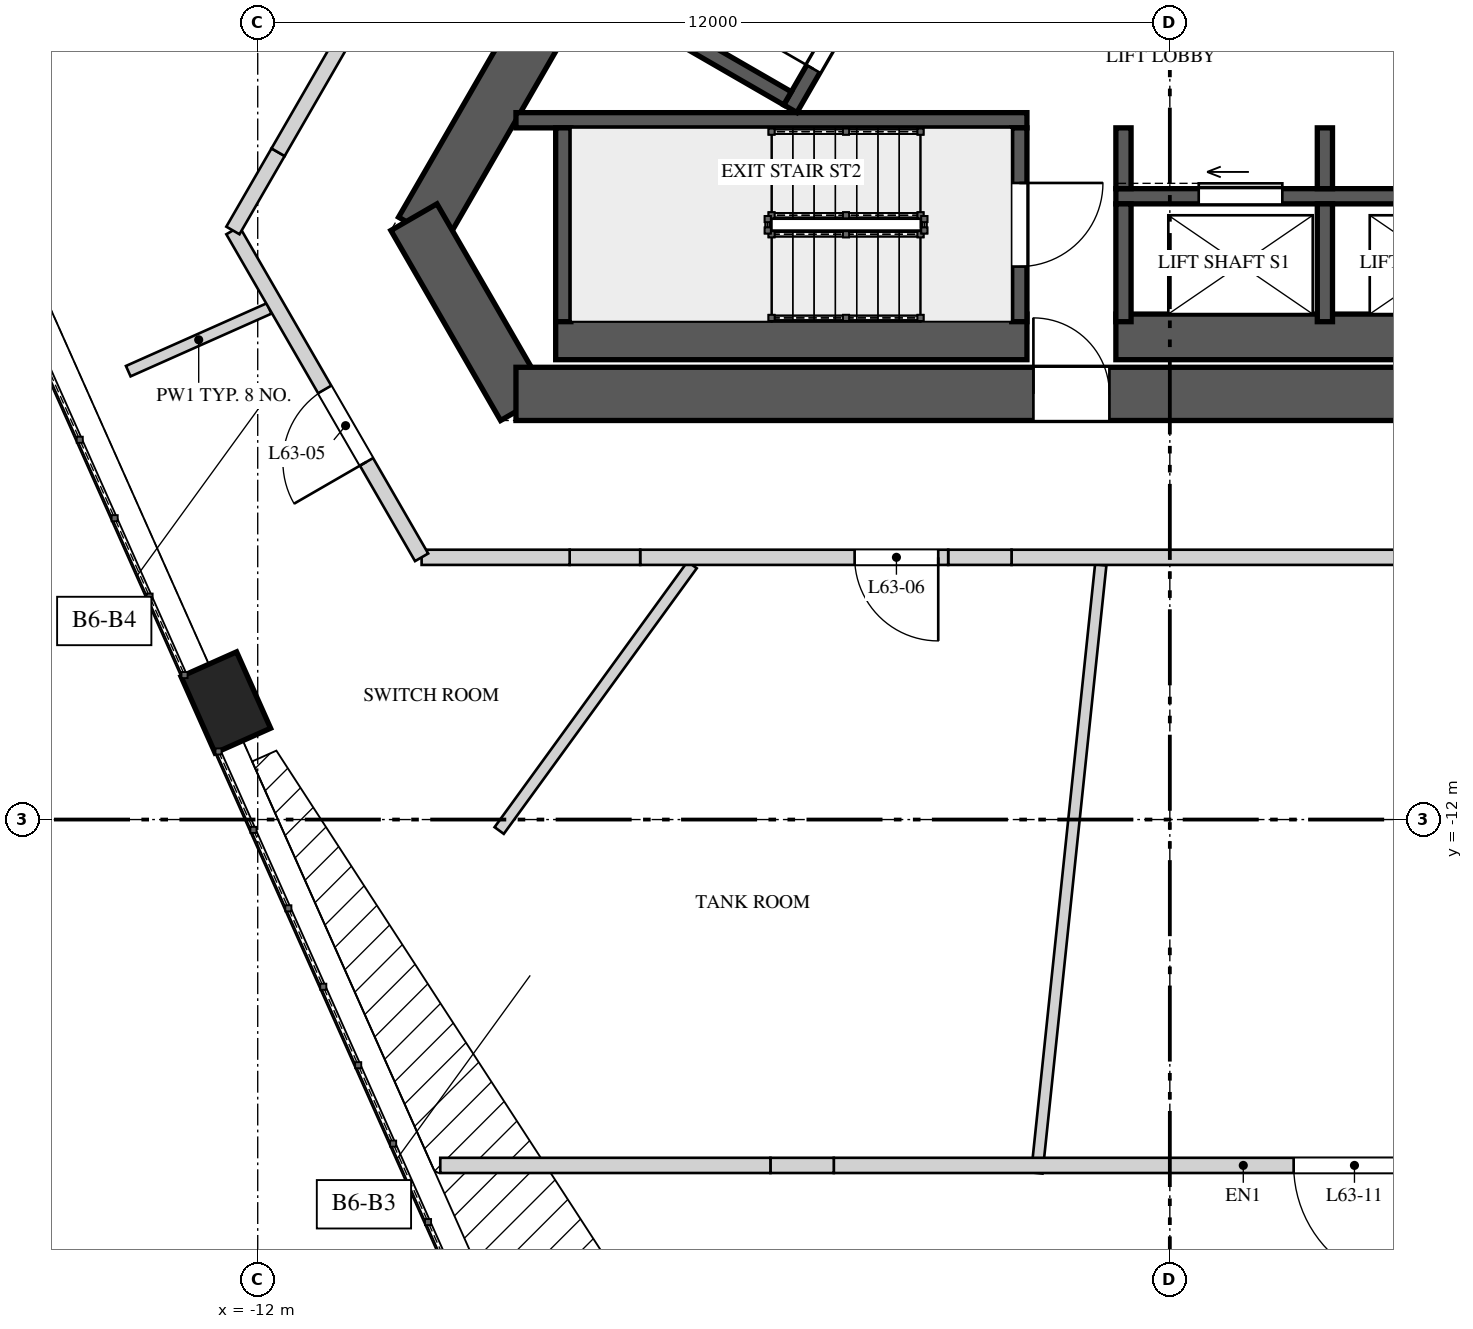
"""IFC4 building model, lengths in metres.
Left out: names, types, materials, properties, quantities, classifications, styles, units other than length and angle.
Written with IfcOpenShell. Run it as: python <this file> out.ifc"""

import sys

from ifc_helpers import new_model, si_unit, direction, frame, frame_2d, origin, origin_2d, place, context, subcontext, project, spatial, rectangle, extrude, element, fill, save


model = new_model("IFC4")
c1 = context("Model", 3, precision=1e-05, world=origin(), true_north=direction((0.0, 1.0)))
c2 = subcontext(c1, "Body", "Model", "MODEL_VIEW")
j1 = project(units=[si_unit("LENGTHUNIT", "METRE"), si_unit("PLANEANGLEUNIT", "RADIAN")], contexts=[c1])
p1 = place(None, origin())
s1 = spatial("IfcSite", under=j1, at=p1, CompositionType="ELEMENT")
p2 = place(p1, origin())
s2 = spatial("IfcBuilding", under=s1, at=p2, CompositionType="ELEMENT")
p3 = place(p2, frame((0.0, 0.0, 269.2)))
s3 = spatial("IfcBuildingStorey", under=s2, at=p3, CompositionType="ELEMENT", Elevation=269.2)
p4 = place(p3, frame((-1.241, 10.65, 0.0), z_axis=(0.0, 0.0, 1.0), x_axis=(-0.500003331888, -0.866023480109, 0.0)))
e1 = element("IfcWall", 1, at=p4, inside=s3, PredefinedType="SHEAR", context=c2, shape_type="SweptSolid", body=[
    extrude(rectangle(XDim=17.205, YDim=0.7, at=frame_2d((8.603, 0.0))), origin(), (0.0, 0.0, 1.0), 5.2),
])
p5 = place(p4, frame((6.808, 0.0, 0.0)))
e2 = element("IfcOpeningElement", 2, at=p5, cuts=e1, PredefinedType="OPENING", context=c2, shape_type="SweptSolid", body=[
    extrude(rectangle(XDim=1.0, YDim=2.4, at=frame_2d((0.5, 1.2))), frame((0.0, 0.36, 0.0), z_axis=(0.0, -1.0, 0.0), x_axis=(1.0, 0.0, 0.0)), (0.0, 0.0, 1.0), 0.72),
])
p6 = place(p3, frame((-9.945, -4.075, 0.0), z_axis=(0.0, 0.0, 1.0), x_axis=(0.499995765644, -0.866027848477, 0.0)))
e3 = element("IfcWall", 3, at=p6, inside=s3, PredefinedType="SHEAR", context=c2, shape_type="SweptSolid", body=[
    extrude(rectangle(XDim=2.887, YDim=0.7, at=frame_2d((1.443, 0.0))), origin(), (0.0, 0.0, 1.0), 5.2),
])
p7 = place(p3, frame((-8.603, -6.4, 0.0), z_axis=(0.0, 0.0, 1.0), x_axis=(1.0, 0.0, 0.0)))
e4 = element("IfcWall", 4, at=p7, inside=s3, PredefinedType="SHEAR", context=c2, shape_type="SweptSolid", body=[
    extrude(rectangle(XDim=17.205, YDim=0.7, at=frame_2d((8.603, 0.0))), origin(), (0.0, 0.0, 1.0), 5.2),
])
p8 = place(p7, frame((6.808, 0.0, 0.0)))
e5 = element("IfcOpeningElement", 5, at=p8, cuts=e4, PredefinedType="OPENING", context=c2, shape_type="SweptSolid", body=[
    extrude(rectangle(XDim=1.0, YDim=2.4, at=frame_2d((0.5, 1.2))), frame((0.0, 0.36, 0.0), z_axis=(0.0, -1.0, 0.0), x_axis=(1.0, 0.0, 0.0)), (0.0, 0.0, 1.0), 0.72),
])
p9 = place(p7, frame((14.922, 0.0, 0.0)))
e6 = element("IfcOpeningElement", 6, at=p9, cuts=e4, PredefinedType="OPENING", context=c2, shape_type="SweptSolid", body=[
    extrude(rectangle(XDim=0.8, YDim=2.1, at=frame_2d((0.4, 1.05))), frame((0.0, 0.36, 0.0), z_axis=(0.0, -1.0, 0.0), x_axis=(1.0, 0.0, 0.0)), (0.0, 0.0, 1.0), 0.72),
])
p10 = place(p3, frame((9.844, -4.25, 0.0), z_axis=(0.0, 0.0, 1.0), x_axis=(-0.500003331888, 0.866023480109, 0.0)))
e7 = element("IfcWall", 7, at=p10, inside=s3, PredefinedType="SHEAR", context=c2, shape_type="SweptSolid", body=[
    extrude(rectangle(XDim=17.205, YDim=0.7, at=frame_2d((8.603, 0.0))), origin(), (0.0, 0.0, 1.0), 5.2),
])
p11 = place(p10, frame((6.877, 0.0, 0.0)))
e8 = element("IfcOpeningElement", 8, at=p11, cuts=e7, PredefinedType="OPENING", context=c2, shape_type="SweptSolid", body=[
    extrude(rectangle(XDim=1.0, YDim=2.4, at=frame_2d((0.5, 1.2))), frame((0.0, 0.36, 0.0), z_axis=(0.0, -1.0, 0.0), x_axis=(1.0, 0.0, 0.0)), (0.0, 0.0, 1.0), 0.72),
])
p12 = place(p10, frame((14.445, 0.0, 0.0)))
e9 = element("IfcOpeningElement", 9, at=p12, cuts=e7, PredefinedType="OPENING", context=c2, shape_type="SweptSolid", body=[
    extrude(rectangle(XDim=0.8, YDim=2.1, at=frame_2d((0.4, 1.05))), frame((0.0, 0.36, 0.0), z_axis=(0.0, -1.0, 0.0), x_axis=(1.0, 0.0, 0.0)), (0.0, 0.0, 1.0), 0.72),
])
p13 = place(p3, frame((-12.42, -10.459, 0.0), z_axis=(0.0, 0.0, 1.0), x_axis=(0.406736643076, -0.913545457643, 0.0)))
e10 = element("IfcColumn", 10, at=p13, inside=s3, PredefinedType="COLUMN", context=c2, shape_type="SweptSolid", body=[
    extrude(rectangle(XDim=1.1, YDim=0.8, at=origin_2d()), origin(), (0.0, 0.0, 1.0), 2.787),
])
p14 = place(p3, frame((-8.08, -5.65, 0.0), z_axis=(0.0, 0.0, 1.0), x_axis=(1.0, 0.0, 0.0)))
e11 = element("IfcWall", 11, at=p14, inside=s3, PredefinedType="SOLIDWALL", context=c2, shape_type="SweptSolid", body=[
    extrude(rectangle(XDim=6.2, YDim=0.6, at=frame_2d((3.1, 0.0))), origin(), (0.0, 0.0, 1.0), 4.85),
])
p15 = place(p3, frame((-8.603, -2.8, 0.0), z_axis=(0.0, 0.0, 1.0), x_axis=(1.0, 0.0, 0.0)))
e12 = element("IfcWall", 12, at=p15, inside=s3, PredefinedType="SOLIDWALL", context=c2, shape_type="SweptSolid", body=[
    extrude(rectangle(XDim=6.723, YDim=0.2, at=frame_2d((3.361, 0.0))), origin(), (0.0, 0.0, 1.0), 4.85),
])
p16 = place(p3, frame((-7.98, -2.9, 0.0), z_axis=(0.0, 0.0, 1.0), x_axis=(0.0, -1.0, 0.0)))
e13 = element("IfcWall", 13, at=p16, inside=s3, PredefinedType="SOLIDWALL", context=c2, shape_type="SweptSolid", body=[
    extrude(rectangle(XDim=2.55, YDim=0.2, at=frame_2d((1.275, 0.0))), origin(), (0.0, 0.0, 1.0), 4.85),
])
p17 = place(p3, frame((-1.98, -2.9, 0.0), z_axis=(0.0, 0.0, 1.0), x_axis=(0.0, -1.0, 0.0)))
e14 = element("IfcWall", 14, at=p17, inside=s3, PredefinedType="SOLIDWALL", context=c2, shape_type="SweptSolid", body=[
    extrude(rectangle(XDim=2.55, YDim=0.2, at=frame_2d((1.275, 0.0))), origin(), (0.0, 0.0, 1.0), 4.85),
])
p18 = place(p17, frame((0.725, 0.0, 0.0)))
e15 = element("IfcOpeningElement", 15, at=p18, cuts=e14, PredefinedType="OPENING", context=c2, shape_type="SweptSolid", body=[
    extrude(rectangle(XDim=1.1, YDim=2.4, at=frame_2d((0.55, 1.2))), frame((0.0, 0.11, 0.0), z_axis=(0.0, -1.0, 0.0), x_axis=(1.0, 0.0, 0.0)), (0.0, 0.0, 1.0), 0.22),
])
p19 = place(p3, frame((-4.993, -2.648, 0.0), z_axis=(0.0, 0.0, 1.0), x_axis=(0.499996545922, 0.866027397988, 0.0)))
e16 = element("IfcWall", 16, at=p19, inside=s3, PredefinedType="SOLIDWALL", context=c2, shape_type="SweptSolid", body=[
    extrude(rectangle(XDim=5.5, YDim=0.2, at=frame_2d((2.75, 0.0))), origin(), (0.0, 0.0, 1.0), 4.85),
])
p20 = place(p19, frame((3.12, 0.0, 0.0)))
e17 = element("IfcOpeningElement", 17, at=p20, cuts=e16, PredefinedType="OPENING", context=c2, shape_type="SweptSolid", body=[
    extrude(rectangle(XDim=0.95, YDim=2.4, at=frame_2d((0.475, 1.2))), frame((0.0, 0.11, 0.0), z_axis=(0.0, -1.0, 0.0), x_axis=(1.0, 0.0, 0.0)), (0.0, 0.0, 1.0), 0.22),
])
p21 = place(p19, frame((0.605, 0.0, 0.0)))
e18 = element("IfcOpeningElement", 18, at=p21, cuts=e16, PredefinedType="OPENING", context=c2, shape_type="SweptSolid", body=[
    extrude(rectangle(XDim=0.8, YDim=2.1, at=frame_2d((0.4, 1.05))), frame((0.0, 0.11, 0.0), z_axis=(0.0, -1.0, 0.0), x_axis=(1.0, 0.0, 0.0)), (0.0, 0.0, 1.0), 0.22),
])
p22 = place(p3, frame((-5.03, -2.512, 0.0), z_axis=(0.0, 0.0, 1.0), x_axis=(-0.866003658127, 0.500037662692, 0.0)))
e19 = element("IfcWall", 19, at=p22, inside=s3, PredefinedType="SOLIDWALL", context=c2, shape_type="SweptSolid", body=[
    extrude(rectangle(XDim=2.95, YDim=0.2, at=frame_2d((1.475, 0.0))), origin(), (0.0, 0.0, 1.0), 4.85),
])
p23 = place(p3, frame((-0.71, -3.8, 0.0), z_axis=(0.0, 0.0, 1.0), x_axis=(1.0, 0.0, 0.0)))
e20 = element("IfcWall", 20, at=p23, inside=s3, PredefinedType="SOLIDWALL", context=c2, shape_type="SweptSolid", body=[
    extrude(rectangle(XDim=5.961, YDim=0.2, at=frame_2d((2.981, 0.0))), origin(), (0.0, 0.0, 1.0), 4.85),
])
p24 = place(p23, frame((1.09, 0.0, 0.0)))
e21 = element("IfcOpeningElement", 21, at=p24, cuts=e20, PredefinedType="OPENING", context=c2, shape_type="SweptSolid", body=[
    extrude(rectangle(XDim=1.1, YDim=2.1, at=frame_2d((0.55, 1.05))), frame((0.0, 0.11, 0.0), z_axis=(0.0, -1.0, 0.0), x_axis=(1.0, 0.0, 0.0)), (0.0, 0.0, 1.0), 0.22),
])
p25 = place(p23, frame((3.74, 0.0, 0.0)))
e22 = element("IfcOpeningElement", 22, at=p25, cuts=e20, PredefinedType="OPENING", context=c2, shape_type="SweptSolid", body=[
    extrude(rectangle(XDim=1.1, YDim=2.1, at=frame_2d((0.55, 1.05))), frame((0.0, 0.11, 0.0), z_axis=(0.0, -1.0, 0.0), x_axis=(1.0, 0.0, 0.0)), (0.0, 0.0, 1.0), 0.22),
])
p26 = place(p3, frame((-0.71, -5.65, 0.0), z_axis=(0.0, 0.0, 1.0), x_axis=(1.0, 0.0, 0.0)))
e23 = element("IfcWall", 23, at=p26, inside=s3, PredefinedType="SOLIDWALL", context=c2, shape_type="SweptSolid", body=[
    extrude(rectangle(XDim=5.5, YDim=0.6, at=frame_2d((2.75, 0.0))), origin(), (0.0, 0.0, 1.0), 4.85),
])
p27 = place(p3, frame((-0.61, -3.9, 0.0), z_axis=(0.0, 0.0, 1.0), x_axis=(0.0, -1.0, 0.0)))
e24 = element("IfcWall", 24, at=p27, inside=s3, PredefinedType="SOLIDWALL", context=c2, shape_type="SweptSolid", body=[
    extrude(rectangle(XDim=1.55, YDim=0.2, at=frame_2d((0.775, 0.0))), origin(), (0.0, 0.0, 1.0), 4.85),
])
p28 = place(p3, frame((-0.61, -2.9, 0.0), z_axis=(0.0, 0.0, 1.0), x_axis=(0.0, -1.0, 0.0)))
e25 = element("IfcWall", 25, at=p28, inside=s3, PredefinedType="SOLIDWALL", context=c2, shape_type="SweptSolid", body=[
    extrude(rectangle(XDim=0.8, YDim=0.2, at=frame_2d((0.4, 0.0))), origin(), (0.0, 0.0, 1.0), 4.85),
])
p29 = place(p3, frame((2.04, -3.9, 0.0), z_axis=(0.0, 0.0, 1.0), x_axis=(0.0, -1.0, 0.0)))
e26 = element("IfcWall", 26, at=p29, inside=s3, PredefinedType="SOLIDWALL", context=c2, shape_type="SweptSolid", body=[
    extrude(rectangle(XDim=1.55, YDim=0.2, at=frame_2d((0.775, 0.0))), origin(), (0.0, 0.0, 1.0), 4.85),
])
p30 = place(p3, frame((2.04, -2.9, 0.0), z_axis=(0.0, 0.0, 1.0), x_axis=(0.0, -1.0, 0.0)))
e27 = element("IfcWall", 27, at=p30, inside=s3, PredefinedType="SOLIDWALL", context=c2, shape_type="SweptSolid", body=[
    extrude(rectangle(XDim=0.8, YDim=0.2, at=frame_2d((0.4, 0.0))), origin(), (0.0, 0.0, 1.0), 4.85),
])
p31 = place(p3, frame((-11.85, -5.276, 0.0), z_axis=(0.0, 0.0, 1.0), x_axis=(-0.913553334727, -0.406718950392, 0.0)))
e28 = element("IfcWall", 28, at=p31, inside=s3, PredefinedType="PARTITIONING", context=c2, shape_type="SweptSolid", body=[
    extrude(rectangle(XDim=2.029, YDim=0.15, at=frame_2d((1.014, 0.0))), origin(), (0.0, 0.0, 1.0), 4.85),
])
p32 = place(p3, frame((-6.285, -8.65, 0.0), z_axis=(0.0, 0.0, 1.0), x_axis=(-0.587748136995, -0.809043958916, 0.0)))
e29 = element("IfcWall", 29, at=p32, inside=s3, PredefinedType="PARTITIONING", context=c2, shape_type="SweptSolid", body=[
    extrude(rectangle(XDim=4.319, YDim=0.15, at=frame_2d((2.16, 0.0))), origin(), (0.0, 0.0, 1.0), 4.85),
])
p33 = place(p3, frame((-0.909, -8.65, 0.0), z_axis=(0.0, 0.0, 1.0), x_axis=(-0.104526794788, -0.994522070731, 0.0)))
e30 = element("IfcWall", 30, at=p33, inside=s3, PredefinedType="PARTITIONING", context=c2, shape_type="SweptSolid", body=[
    extrude(rectangle(XDim=8.044, YDim=0.15, at=frame_2d((4.022, 0.0))), origin(), (0.0, 0.0, 1.0), 4.85),
])
p34 = place(p3, frame((3.073, -8.55, 0.0), z_axis=(0.0, 0.0, 1.0), x_axis=(-1.0, 0.0, 0.0)))
e31 = element("IfcWall", 31, at=p34, inside=s3, PredefinedType="SOLIDWALL", context=c2, shape_type="SweptSolid", body=[
    extrude(rectangle(XDim=5.156, YDim=0.2, at=frame_2d((2.578, 0.0))), origin(), (0.0, 0.0, 1.0), 4.85),
])
p35 = place(p3, frame((-2.083, -8.55, 0.0), z_axis=(0.0, 0.0, 1.0), x_axis=(-1.0, 0.0, 0.0)))
e32 = element("IfcWall", 32, at=p35, inside=s3, PredefinedType="SOLIDWALL", context=c2, shape_type="SweptSolid", body=[
    extrude(rectangle(XDim=0.833, YDim=0.2, at=frame_2d((0.417, 0.0))), origin(), (0.0, 0.0, 1.0), 3.95),
])
p36 = place(p3, frame((-2.916, -8.55, 0.0), z_axis=(0.0, 0.0, 1.0), x_axis=(-1.0, 0.0, 0.0)))
e33 = element("IfcWall", 33, at=p36, inside=s3, PredefinedType="SOLIDWALL", context=c2, shape_type="SweptSolid", body=[
    extrude(rectangle(XDim=4.052, YDim=0.2, at=frame_2d((2.026, 0.0))), origin(), (0.0, 0.0, 1.0), 4.85),
])
p37 = place(p36, frame((0.131, 0.0, 0.0)))
e34 = element("IfcOpeningElement", 34, at=p37, cuts=e33, PredefinedType="OPENING", context=c2, shape_type="SweptSolid", body=[
    extrude(rectangle(XDim=1.1, YDim=2.2, at=frame_2d((0.55, 1.1))), frame((0.0, 0.11, 0.0), z_axis=(0.0, -1.0, 0.0), x_axis=(1.0, 0.0, 0.0)), (0.0, 0.0, 1.0), 0.22),
])
p38 = place(p3, frame((-6.969, -8.55, 0.0), z_axis=(0.0, 0.0, 1.0), x_axis=(-1.0, 0.0, 0.0)))
e35 = element("IfcWall", 35, at=p38, inside=s3, PredefinedType="SOLIDWALL", context=c2, shape_type="SweptSolid", body=[
    extrude(rectangle(XDim=0.927, YDim=0.2, at=frame_2d((0.464, 0.0))), origin(), (0.0, 0.0, 1.0), 4.15),
])
p39 = place(p3, frame((-7.896, -8.55, 0.0), z_axis=(0.0, 0.0, 1.0), x_axis=(-1.0, 0.0, 0.0)))
e36 = element("IfcWall", 36, at=p39, inside=s3, PredefinedType="SOLIDWALL", context=c2, shape_type="SweptSolid", body=[
    extrude(rectangle(XDim=1.948, YDim=0.2, at=frame_2d((0.974, 0.0))), origin(), (0.0, 0.0, 1.0), 4.85),
])
p40 = place(p3, frame((-9.844, -8.55, 0.0), z_axis=(0.0, 0.0, 1.0), x_axis=(-0.50000478328, 0.866022642139, 0.0)))
e37 = element("IfcWall", 37, at=p40, inside=s3, PredefinedType="SOLIDWALL", context=c2, shape_type="SweptSolid", body=[
    extrude(rectangle(XDim=4.965, YDim=0.2, at=frame_2d((2.483, 0.0))), origin(), (0.0, 0.0, 1.0), 4.85),
])
p41 = place(p40, frame((1.45, 0.0, 0.0)))
e38 = element("IfcOpeningElement", 38, at=p41, cuts=e37, PredefinedType="OPENING", context=c2, shape_type="SweptSolid", body=[
    extrude(rectangle(XDim=1.1, YDim=2.2, at=frame_2d((0.55, 1.1))), frame((0.0, 0.11, 0.0), z_axis=(0.0, -1.0, 0.0), x_axis=(1.0, 0.0, 0.0)), (0.0, 0.0, 1.0), 0.22),
])
p42 = place(p3, frame((-12.326, -4.25, 0.0), z_axis=(0.0, 0.0, 1.0), x_axis=(0.499983247966, 0.86603507536, 0.0)))
e39 = element("IfcWall", 39, at=p42, inside=s3, PredefinedType="SOLIDWALL", context=c2, shape_type="SweptSolid", body=[
    extrude(rectangle(XDim=1.188, YDim=0.2, at=frame_2d((0.594, 0.0))), origin(), (0.0, 0.0, 1.0), 4.15),
])
p43 = place(p3, frame((-11.732, -3.221, 0.0), z_axis=(0.0, 0.0, 1.0), x_axis=(0.500018146515, 0.866014926636, 0.0)))
e40 = element("IfcWall", 40, at=p43, inside=s3, PredefinedType="SOLIDWALL", context=c2, shape_type="SweptSolid", body=[
    extrude(rectangle(XDim=3.669, YDim=0.2, at=frame_2d((1.834, 0.0))), origin(), (0.0, 0.0, 1.0), 4.85),
])
p44 = place(p3, frame((6.354, -16.55, 0.0), z_axis=(0.0, 0.0, 1.0), x_axis=(-1.0, 0.0, 0.0)))
e41 = element("IfcWall", 41, at=p44, inside=s3, PredefinedType="SOLIDWALL", context=c2, shape_type="SweptSolid", body=[
    extrude(rectangle(XDim=10.775, YDim=0.2, at=frame_2d((5.387, 0.0))), origin(), (0.0, 0.0, 1.0), 4.85),
])
p45 = place(p44, frame((3.125, 0.0, 0.0)))
e42 = element("IfcOpeningElement", 42, at=p45, cuts=e41, PredefinedType="OPENING", context=c2, shape_type="SweptSolid", body=[
    extrude(rectangle(XDim=1.6, YDim=2.3, at=frame_2d((0.8, 1.15))), frame((0.0, 0.11, 0.0), z_axis=(0.0, -1.0, 0.0), x_axis=(1.0, 0.0, 0.0)), (0.0, 0.0, 1.0), 0.22),
])
p46 = place(p3, frame((-4.421, -16.55, 0.0), z_axis=(0.0, 0.0, 1.0), x_axis=(-1.0, 0.0, 0.0)))
e43 = element("IfcWall", 43, at=p46, inside=s3, PredefinedType="SOLIDWALL", context=c2, shape_type="SweptSolid", body=[
    extrude(rectangle(XDim=0.833, YDim=0.2, at=frame_2d((0.417, 0.0))), origin(), (0.0, 0.0, 1.0), 3.95),
])
p47 = place(p3, frame((-5.255, -16.55, 0.0), z_axis=(0.0, 0.0, 1.0), x_axis=(-1.0, 0.0, 0.0)))
e44 = element("IfcWall", 44, at=p47, inside=s3, PredefinedType="SOLIDWALL", context=c2, shape_type="SweptSolid", body=[
    extrude(rectangle(XDim=4.344, YDim=0.2, at=frame_2d((2.172, 0.0))), origin(), (0.0, 0.0, 1.0), 4.85),
])
p48 = place(p18, origin())
e45 = element("IfcDoor", 45, at=p48, inside=s3, OperationType="SINGLE_SWING_LEFT", PredefinedType="DOOR", context=c2, shape_type="SweptSolid", body=[
    extrude(rectangle(XDim=1.1, YDim=2.4, at=frame_2d((0.55, 1.2))), frame((0.0, 0.025, 0.0), z_axis=(0.0, -1.0, 0.0), x_axis=(1.0, 0.0, 0.0)), (0.0, 0.0, 1.0), 0.05),
])
fill(e15, e45)
p49 = place(p21, origin())
e46 = element("IfcDoor", 46, at=p49, inside=s3, OperationType="SINGLE_SWING_RIGHT", PredefinedType="DOOR", context=c2, shape_type="SweptSolid", body=[
    extrude(rectangle(XDim=0.8, YDim=2.1, at=frame_2d((0.4, 1.05))), frame((0.0, 0.025, 0.0), z_axis=(0.0, -1.0, 0.0), x_axis=(1.0, 0.0, 0.0)), (0.0, 0.0, 1.0), 0.05),
])
fill(e18, e46)
p50 = place(p24, origin())
e47 = element("IfcDoor", 47, at=p50, inside=s3, OperationType="SLIDING_TO_LEFT", PredefinedType="DOOR", context=c2, shape_type="SweptSolid", body=[
    extrude(rectangle(XDim=1.1, YDim=2.1, at=frame_2d((0.55, 1.05))), frame((0.0, 0.025, 0.0), z_axis=(0.0, -1.0, 0.0), x_axis=(1.0, 0.0, 0.0)), (0.0, 0.0, 1.0), 0.05),
])
fill(e21, e47)
p51 = place(p8, origin())
e48 = element("IfcDoor", 48, at=p51, inside=s3, OperationType="SINGLE_SWING_LEFT", PredefinedType="DOOR", context=c2, shape_type="SweptSolid", body=[
    extrude(rectangle(XDim=1.0, YDim=2.4, at=frame_2d((0.5, 1.2))), frame((0.0, 0.025, 0.0), z_axis=(0.0, -1.0, 0.0), x_axis=(1.0, 0.0, 0.0)), (0.0, 0.0, 1.0), 0.05),
])
fill(e5, e48)
p52 = place(p41, origin())
e49 = element("IfcDoor", 49, at=p52, inside=s3, OperationType="SINGLE_SWING_LEFT", PredefinedType="DOOR", context=c2, shape_type="SweptSolid", body=[
    extrude(rectangle(XDim=1.1, YDim=2.2, at=frame_2d((0.55, 1.1))), frame((0.0, 0.025, 0.0), z_axis=(0.0, -1.0, 0.0), x_axis=(1.0, 0.0, 0.0)), (0.0, 0.0, 1.0), 0.05),
])
fill(e38, e49)
p53 = place(p37, origin())
e50 = element("IfcDoor", 50, at=p53, inside=s3, OperationType="SINGLE_SWING_RIGHT", PredefinedType="DOOR", context=c2, shape_type="SweptSolid", body=[
    extrude(rectangle(XDim=1.1, YDim=2.2, at=frame_2d((0.55, 1.1))), frame((0.0, 0.025, 0.0), z_axis=(0.0, -1.0, 0.0), x_axis=(1.0, 0.0, 0.0)), (0.0, 0.0, 1.0), 0.05),
])
fill(e34, e50)
p54 = place(p45, origin())
e51 = element("IfcDoor", 51, at=p54, inside=s3, OperationType="DOUBLE_DOOR_SINGLE_SWING", PredefinedType="DOOR", context=c2, shape_type="SweptSolid", body=[
    extrude(rectangle(XDim=1.6, YDim=2.3, at=frame_2d((0.8, 1.15))), frame((0.0, 0.025, 0.0), z_axis=(0.0, -1.0, 0.0), x_axis=(1.0, 0.0, 0.0)), (0.0, 0.0, 1.0), 0.05),
])
fill(e42, e51)
save(model, sys.argv[1])
